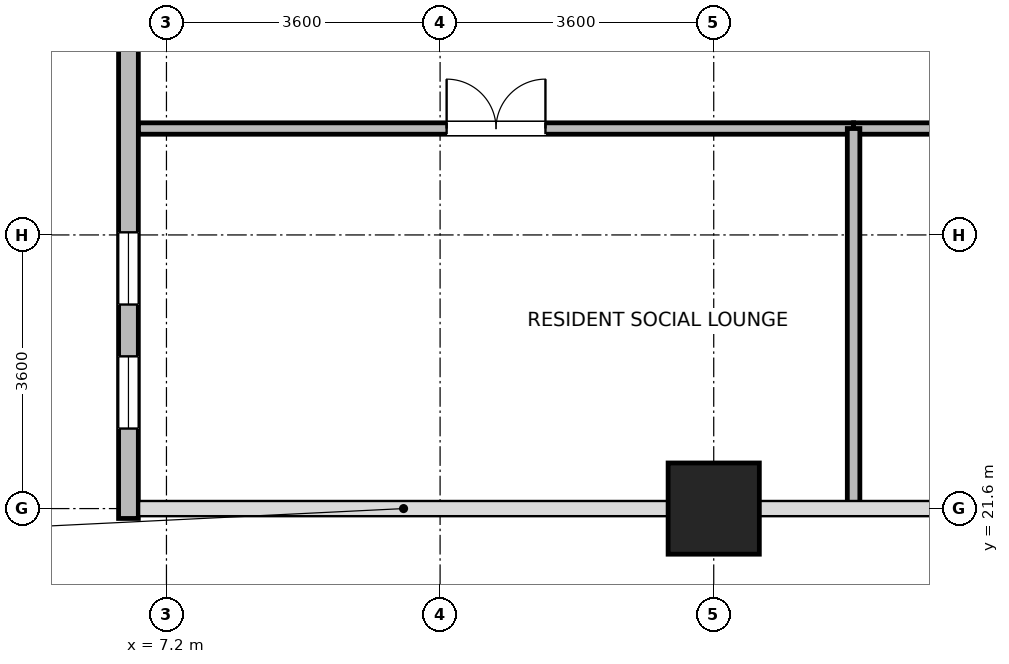
"""IFC4 building model, lengths in metres.
Left out: names, types, materials, properties, quantities, classifications, styles, units other than length and angle.
Written with IfcOpenShell. Run it as: python <this file> out.ifc"""

import sys

from ifc_helpers import new_model, si_unit, direction, frame, frame_2d, origin, origin_2d, place, context, subcontext, project, spatial, rectangle, extrude, source, transform, mapped, element, fill, save


model = new_model("IFC4")
c1 = context("Model", 3, precision=1e-05, world=origin(), true_north=direction((0.0, 1.0)))
c2 = subcontext(c1, "Body", "Model", "MODEL_VIEW")
j1 = project(units=[si_unit("LENGTHUNIT", "METRE"), si_unit("PLANEANGLEUNIT", "RADIAN")], contexts=[c1])
p1 = place(None, origin())
s1 = spatial("IfcSite", under=j1, at=p1, CompositionType="ELEMENT")
p2 = place(p1, origin())
s2 = spatial("IfcBuilding", under=s1, at=p2, CompositionType="ELEMENT")
p3 = place(p2, frame((0.0, 0.0, 82.3)))
s3 = spatial("IfcBuildingStorey", under=s2, at=p3, CompositionType="ELEMENT", Elevation=82.3)
m1 = source(origin(), c2, "Body", "SweptSolid", [
    extrude(rectangle(XDim=1.2, YDim=1.2, at=origin_2d()), origin(), (0.0, 0.0, 1.0), 3.7),
])
p4 = place(p3, frame((14.4, 21.6, 0.0), z_axis=(0.0, 0.0, 1.0), x_axis=(1.0, 0.0, 0.0)))
e1 = element("IfcColumn", 1, at=p4, inside=s3, PredefinedType="COLUMN", context=c2, shape_type="MappedRepresentation", body=[
    mapped(m1, transform((0.0, 0.0, 0.0), x_axis=(1.0, 0.0, 0.0), y_axis=(0.0, 1.0, 0.0), z_axis=(0.0, 0.0, 1.0), scale=1.0)),
])
p5 = place(p3, frame((6.7, 21.47, 0.0), z_axis=(0.0, 0.0, 1.0), x_axis=(0.0, 1.0, 0.0)))
e2 = element("IfcWall", 2, at=p5, inside=s3, PredefinedType="STANDARD", context=c2, shape_type="SweptSolid", body=[
    extrude(rectangle(XDim=6.579, YDim=0.26, at=frame_2d((3.29, 0.0))), origin(), (0.0, 0.0, 1.0), 3.43),
])
p6 = place(p5, frame((2.814, 0.0, 0.85)))
e3 = element("IfcOpeningElement", 3, at=p6, cuts=e2, PredefinedType="OPENING", context=c2, shape_type="SweptSolid", body=[
    extrude(rectangle(XDim=0.95, YDim=1.75, at=frame_2d((0.475, 0.875))), frame((0.0, 0.14, 0.0), z_axis=(0.0, -1.0, 0.0), x_axis=(1.0, 0.0, 0.0)), (0.0, 0.0, 1.0), 0.28),
])
p7 = place(p5, frame((1.183, 0.0, 0.85)))
e4 = element("IfcOpeningElement", 4, at=p7, cuts=e2, PredefinedType="OPENING", context=c2, shape_type="SweptSolid", body=[
    extrude(rectangle(XDim=0.95, YDim=1.75, at=frame_2d((0.475, 0.875))), frame((0.0, 0.14, 0.0), z_axis=(0.0, -1.0, 0.0), x_axis=(1.0, 0.0, 0.0)), (0.0, 0.0, 1.0), 0.28),
])
p8 = place(p3, frame((6.832, 26.6, 0.0), z_axis=(0.0, 0.0, 1.0), x_axis=(1.0, 0.0, 0.0)))
e5 = element("IfcWall", 5, at=p8, inside=s3, PredefinedType="PARTITIONING", context=c2, shape_type="SweptSolid", body=[
    extrude(rectangle(XDim=9.408, YDim=0.15, at=frame_2d((4.704, 0.0))), origin(), (0.0, 0.0, 1.0), 3.43),
])
p9 = place(p8, frame((4.054, 0.0, 0.0)))
e6 = element("IfcOpeningElement", 6, at=p9, cuts=e5, PredefinedType="OPENING", context=c2, shape_type="SweptSolid", body=[
    extrude(rectangle(XDim=1.3, YDim=2.12, at=frame_2d((0.65, 1.06))), frame((0.0, 0.085, 0.0), z_axis=(0.0, -1.0, 0.0), x_axis=(1.0, 0.0, 0.0)), (0.0, 0.0, 1.0), 0.17),
])
p10 = place(p3, frame((16.24, 26.6, 0.0), z_axis=(0.0, 0.0, 1.0), x_axis=(1.0, 0.0, 0.0)))
e7 = element("IfcWall", 7, at=p10, inside=s3, PredefinedType="PARTITIONING", context=c2, shape_type="SweptSolid", body=[
    extrude(rectangle(XDim=8.68, YDim=0.15, at=frame_2d((4.34, 0.0))), origin(), (0.0, 0.0, 1.0), 3.43),
])
p11 = place(p10, frame((3.89, 0.0, 0.0)))
e8 = element("IfcOpeningElement", 8, at=p11, cuts=e7, PredefinedType="OPENING", context=c2, shape_type="SweptSolid", body=[
    extrude(rectangle(XDim=0.9, YDim=2.08, at=frame_2d((0.45, 1.04))), frame((0.0, 0.085, 0.0), z_axis=(0.0, -1.0, 0.0), x_axis=(1.0, 0.0, 0.0)), (0.0, 0.0, 1.0), 0.17),
])
p12 = place(p3, frame((16.24, 21.62, 0.0), z_axis=(0.0, 0.0, 1.0), x_axis=(0.0, 1.0, 0.0)))
e9 = element("IfcWall", 9, at=p12, inside=s3, PredefinedType="PARTITIONING", context=c2, shape_type="SweptSolid", body=[
    extrude(rectangle(XDim=4.98, YDim=0.165, at=frame_2d((2.49, 0.0))), origin(), (0.0, 0.0, 1.0), 3.43),
])
p13 = place(p6, origin())
e10 = element("IfcWindow", 10, at=p13, inside=s3, PartitioningType="SINGLE_PANEL", PredefinedType="WINDOW", context=c2, shape_type="SweptSolid", body=[
    extrude(rectangle(XDim=0.95, YDim=1.75, at=frame_2d((0.475, 0.875))), frame((0.0, 0.03, 0.0), z_axis=(0.0, -1.0, 0.0), x_axis=(1.0, 0.0, 0.0)), (0.0, 0.0, 1.0), 0.06),
])
fill(e3, e10)
p14 = place(p7, origin())
e11 = element("IfcWindow", 11, at=p14, inside=s3, PartitioningType="SINGLE_PANEL", PredefinedType="WINDOW", context=c2, shape_type="SweptSolid", body=[
    extrude(rectangle(XDim=0.95, YDim=1.75, at=frame_2d((0.475, 0.875))), frame((0.0, 0.03, 0.0), z_axis=(0.0, -1.0, 0.0), x_axis=(1.0, 0.0, 0.0)), (0.0, 0.0, 1.0), 0.06),
])
fill(e4, e11)
p15 = place(p9, origin())
e12 = element("IfcDoor", 12, at=p15, inside=s3, OperationType="DOUBLE_DOOR_SINGLE_SWING", PredefinedType="DOOR", context=c2, shape_type="SweptSolid", body=[
    extrude(rectangle(XDim=1.3, YDim=2.12, at=frame_2d((0.65, 1.06))), frame((0.0, 0.025, 0.0), z_axis=(0.0, -1.0, 0.0), x_axis=(1.0, 0.0, 0.0)), (0.0, 0.0, 1.0), 0.05),
])
fill(e6, e12)
save(model, sys.argv[1])
